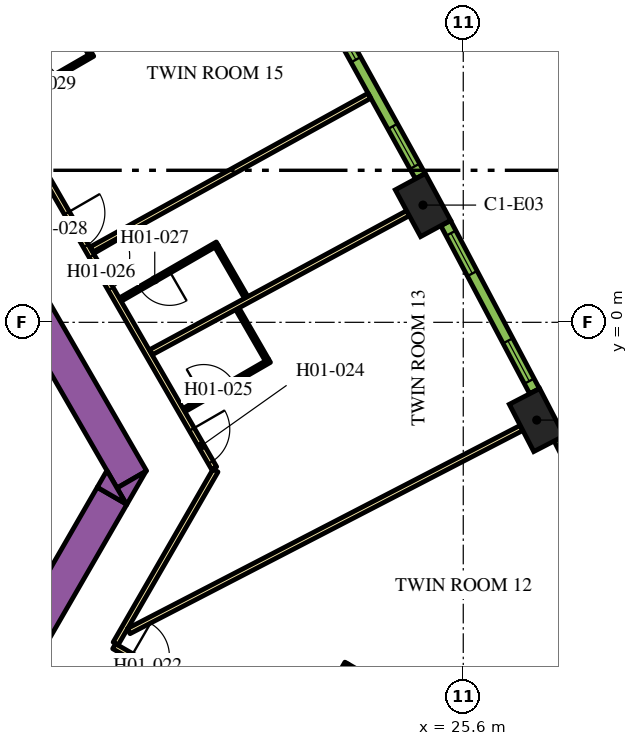
"""IFC4 building model, lengths in metres.
Left out: names, types, materials, properties, quantities, classifications, styles, units other than length and angle.
Written with IfcOpenShell. Run it as: python <this file> out.ifc"""

import sys

from ifc_helpers import new_model, si_unit, direction, frame, frame_2d, origin, origin_2d, place, context, subcontext, project, spatial, polyline, rectangle, outline, extrude, element, fill, save


model = new_model("IFC4")
c1 = context("Model", 3, precision=1e-05, world=origin(), true_north=direction((0.0, 1.0)))
c2 = subcontext(c1, "Body", "Model", "MODEL_VIEW")
j1 = project(units=[si_unit("LENGTHUNIT", "METRE"), si_unit("PLANEANGLEUNIT", "RADIAN")], contexts=[c1])
p1 = place(None, origin())
s1 = spatial("IfcSite", under=j1, at=p1, CompositionType="ELEMENT")
p2 = place(p1, origin())
s2 = spatial("IfcBuilding", under=s1, at=p2, CompositionType="ELEMENT")
p3 = place(p2, frame((0.0, 0.0, 35.4)))
s3 = spatial("IfcBuildingStorey", under=s2, at=p3, CompositionType="ELEMENT", Elevation=35.4)
for number, where, z_axis, x_axis in (
    (1, (27.533, -2.572, 0.0), (0.0, 0.0, 1.0), (-0.459, 0.888, 0.0)),
    (2, (24.54, 3.085, 0.0), (0.0, 0.0, 1.0), (-0.476, 0.88, 0.0)),
):
    element("IfcColumn", number, at=place(p3, frame(where, z_axis=z_axis, x_axis=x_axis)), inside=s3, PredefinedType="COLUMN", context=c2, shape_type="SweptSolid", body=[
        extrude(rectangle(XDim=1.4, YDim=0.9, at=origin_2d()), origin(), (0.0, 0.0, 1.0), 3.9),
    ])
p4 = place(p3, frame((6.711, 13.476, 0.0), z_axis=(0.0, 0.0, 1.0), x_axis=(0.500002723396, -0.866023831425, 0.0)))
e3 = element("IfcWall", 3, at=p4, inside=s3, PredefinedType="SOLIDWALL", context=c2, shape_type="SweptSolid", body=[
    extrude(rectangle(XDim=20.334, YDim=0.9, at=frame_2d((10.167, 0.0))), origin(), (0.0, 0.0, 1.0), 3.9),
])
p5 = place(p3, origin())
e4 = element("IfcWall", 4, at=p5, inside=s3, PredefinedType="SOLIDWALL", context=c2, shape_type="SweptSolid", body=[
    extrude(outline(polyline([(16.743, -4.8), (16.489, -4.36), (17.251, -3.92), (16.743, -4.8)])), origin(), (0.0, 0.0, 1.0), 3.9),
])
p6 = place(p3, frame((11.695, -12.644, 0.0), z_axis=(0.0, 0.0, 1.0), x_axis=(0.500010229568, 0.86601949766, 0.0)))
e5 = element("IfcWall", 5, at=p6, inside=s3, PredefinedType="SOLIDWALL", context=c2, shape_type="SweptSolid", body=[
    extrude(rectangle(XDim=9.326, YDim=0.9, at=frame_2d((4.663, 0.0))), origin(), (0.0, 0.0, 1.0), 3.9),
])
e6 = element("IfcWall", 6, at=p5, inside=s3, PredefinedType="SOLIDWALL", context=c2, shape_type="SweptSolid", body=[
    extrude(outline(polyline([(16.223, -3.9), (16.732, -4.78), (15.969, -4.34), (16.223, -3.9)])), origin(), (0.0, 0.0, 1.0), 3.9),
])
p7 = place(p3, frame((16.412, -8.523, 0.0), z_axis=(0.0, 0.0, 1.0), x_axis=(0.866022197818, -0.500005552856, 0.0)))
e7 = element("IfcWall", 7, at=p7, inside=s3, PredefinedType="PARTITIONING", context=c2, shape_type="SweptSolid", body=[
    extrude(rectangle(XDim=16.224, YDim=0.15, at=frame_2d((8.112, 0.0))), origin(), (0.0, 0.0, 1.0), 2.75),
])
p8 = place(p7, frame((7.949, 0.0, 0.0)))
e8 = element("IfcOpeningElement", 8, at=p8, cuts=e7, PredefinedType="OPENING", context=c2, shape_type="SweptSolid", body=[
    extrude(rectangle(XDim=1.0, YDim=2.1, at=frame_2d((0.5, 1.05))), frame((0.0, 0.085, 0.0), z_axis=(0.0, -1.0, 0.0), x_axis=(1.0, 0.0, 0.0)), (0.0, 0.0, 1.0), 0.17),
])
p9 = place(p7, frame((0.526, 0.0, 0.0)))
e9 = element("IfcOpeningElement", 9, at=p9, cuts=e7, PredefinedType="OPENING", context=c2, shape_type="SweptSolid", body=[
    extrude(rectangle(XDim=1.0, YDim=2.1, at=frame_2d((0.5, 1.05))), frame((0.0, 0.085, 0.0), z_axis=(0.0, -1.0, 0.0), x_axis=(1.0, 0.0, 0.0)), (0.0, 0.0, 1.0), 0.17),
])
p10 = place(p3, frame((19.081, -3.9, 0.0), z_axis=(0.0, 0.0, 1.0), x_axis=(-0.499974327079, -0.866040225545, 0.0)))
e10 = element("IfcWall", 10, at=p10, inside=s3, PredefinedType="PARTITIONING", context=c2, shape_type="SweptSolid", body=[
    extrude(rectangle(XDim=5.258, YDim=0.15, at=frame_2d((2.629, 0.0))), origin(), (0.0, 0.0, 1.0), 2.75),
])
p11 = place(p3, frame((6.163, 18.475, 0.0), z_axis=(0.0, 0.0, 1.0), x_axis=(0.500001317485, -0.866024643133, 0.0)))
e11 = element("IfcWall", 11, at=p11, inside=s3, PredefinedType="PARTITIONING", context=c2, shape_type="SweptSolid", body=[
    extrude(rectangle(XDim=25.767, YDim=0.15, at=frame_2d((12.883, 0.0))), origin(), (0.0, 0.0, 1.0), 2.75),
])
p12 = place(p11, frame((24.586, 0.0, 0.0)))
e12 = element("IfcOpeningElement", 12, at=p12, cuts=e11, PredefinedType="OPENING", context=c2, shape_type="SweptSolid", body=[
    extrude(rectangle(XDim=1.0, YDim=2.1, at=frame_2d((0.5, 1.05))), frame((0.0, 0.085, 0.0), z_axis=(0.0, -1.0, 0.0), x_axis=(1.0, 0.0, 0.0)), (0.0, 0.0, 1.0), 0.17),
])
p13 = place(p11, frame((19.319, 0.0, 0.0)))
e13 = element("IfcOpeningElement", 13, at=p13, cuts=e11, PredefinedType="OPENING", context=c2, shape_type="SweptSolid", body=[
    extrude(rectangle(XDim=1.0, YDim=2.1, at=frame_2d((0.5, 1.05))), frame((0.0, 0.085, 0.0), z_axis=(0.0, -1.0, 0.0), x_axis=(1.0, 0.0, 0.0)), (0.0, 0.0, 1.0), 0.17),
])
p14 = place(p11, frame((18.012, 0.0, 0.0)))
e14 = element("IfcOpeningElement", 14, at=p14, cuts=e11, PredefinedType="OPENING", context=c2, shape_type="SweptSolid", body=[
    extrude(rectangle(XDim=1.0, YDim=2.1, at=frame_2d((0.5, 1.05))), frame((0.0, 0.085, 0.0), z_axis=(0.0, -1.0, 0.0), x_axis=(1.0, 0.0, 0.0)), (0.0, 0.0, 1.0), 0.17),
])
p15 = place(p11, frame((6.824, 0.0, 0.0)))
e15 = element("IfcOpeningElement", 15, at=p15, cuts=e11, PredefinedType="OPENING", context=c2, shape_type="SweptSolid", body=[
    extrude(rectangle(XDim=1.1, YDim=2.1, at=frame_2d((0.55, 1.05))), frame((0.0, 0.085, 0.0), z_axis=(0.0, -1.0, 0.0), x_axis=(1.0, 0.0, 0.0)), (0.0, 0.0, 1.0), 0.17),
])
p16 = place(p11, frame((4.658, 0.0, 0.0)))
e16 = element("IfcOpeningElement", 16, at=p16, cuts=e11, PredefinedType="OPENING", context=c2, shape_type="SweptSolid", body=[
    extrude(rectangle(XDim=0.9, YDim=2.1, at=frame_2d((0.45, 1.05))), frame((0.0, 0.085, 0.0), z_axis=(0.0, -1.0, 0.0), x_axis=(1.0, 0.0, 0.0)), (0.0, 0.0, 1.0), 0.17),
])
p17 = place(p11, frame((0.18, 0.0, 0.0)))
e17 = element("IfcOpeningElement", 17, at=p17, cuts=e11, PredefinedType="OPENING", context=c2, shape_type="SweptSolid", body=[
    extrude(rectangle(XDim=1.0, YDim=2.1, at=frame_2d((0.5, 1.05))), frame((0.0, 0.085, 0.0), z_axis=(0.0, -1.0, 0.0), x_axis=(1.0, 0.0, 0.0)), (0.0, 0.0, 1.0), 0.17),
])
p18 = place(p3, frame((23.132, 5.962, 0.0), z_axis=(0.0, 0.0, 1.0), x_axis=(-0.875121716713, -0.483902863121, 0.0)))
e18 = element("IfcWall", 18, at=p18, inside=s3, PredefinedType="PARTITIONING", context=c2, shape_type="SweptSolid", body=[
    extrude(rectangle(XDim=8.355, YDim=0.15, at=frame_2d((4.178, 0.0))), origin(), (0.0, 0.0, 1.0), 2.75),
])
p19 = place(p3, frame((27.134, -2.779, 0.0), z_axis=(0.0, 0.0, 1.0), x_axis=(-0.8882049501, -0.459447457951, 0.0)))
e19 = element("IfcWall", 19, at=p19, inside=s3, PredefinedType="PARTITIONING", context=c2, shape_type="SweptSolid", body=[
    extrude(rectangle(XDim=11.638, YDim=0.15, at=frame_2d((5.819, 0.0))), origin(), (0.0, 0.0, 1.0), 2.75),
])
p20 = place(p3, frame((24.145, 2.871, 0.0), z_axis=(0.0, 0.0, 1.0), x_axis=(-0.879551725039, -0.475803281809, 0.0)))
e20 = element("IfcWall", 20, at=p20, inside=s3, PredefinedType="PARTITIONING", context=c2, shape_type="SweptSolid", body=[
    extrude(rectangle(XDim=7.688, YDim=0.15, at=frame_2d((3.844, 0.0))), origin(), (0.0, 0.0, 1.0), 2.75),
])
p21 = place(p3, frame((30.018, -8.483, 0.0), z_axis=(0.0, 0.0, 1.0), x_axis=(-0.896544505264, -0.44295366584, 0.0)))
e21 = element("IfcWall", 21, at=p21, inside=s3, PredefinedType="PARTITIONING", context=c2, shape_type="SweptSolid", body=[
    extrude(rectangle(XDim=8.079, YDim=0.15, at=frame_2d((4.04, 0.0))), origin(), (0.0, 0.0, 1.0), 2.75),
])
p22 = place(p3, frame((22.53, -8.966, 0.0), z_axis=(0.0, 0.0, 1.0), x_axis=(-0.500006934395, -0.866021400173, 0.0)))
e22 = element("IfcWall", 22, at=p22, inside=s3, PredefinedType="PARTITIONING", context=c2, shape_type="SweptSolid", body=[
    extrude(rectangle(XDim=2.6, YDim=0.1, at=frame_2d((1.3, 0.0))), origin(), (0.0, 0.0, 1.0), 2.75),
])
p23 = place(p22, frame((1.1, 0.0, 0.0)))
e23 = element("IfcOpeningElement", 23, at=p23, cuts=e22, PredefinedType="OPENING", context=c2, shape_type="SweptSolid", body=[
    extrude(rectangle(XDim=0.9, YDim=2.1, at=frame_2d((0.45, 1.05))), frame((0.0, 0.06, 0.0), z_axis=(0.0, -1.0, 0.0), x_axis=(1.0, 0.0, 0.0)), (0.0, 0.0, 1.0), 0.12),
])
p24 = place(p3, frame((22.549, -9.035, 0.0), z_axis=(0.0, 0.0, 1.0), x_axis=(0.86605165483, -0.499954529098, 0.0)))
e24 = element("IfcWall", 24, at=p24, inside=s3, PredefinedType="PARTITIONING", context=c2, shape_type="SweptSolid", body=[
    extrude(rectangle(XDim=1.7, YDim=0.1, at=frame_2d((0.85, 0.0))), origin(), (0.0, 0.0, 1.0), 2.75),
])
p25 = place(p3, frame((18.25, -2.311, 0.0), z_axis=(0.0, 0.0, 1.0), x_axis=(0.866021400173, 0.500006934395, 0.0)))
e25 = element("IfcWall", 25, at=p25, inside=s3, PredefinedType="PARTITIONING", context=c2, shape_type="SweptSolid", body=[
    extrude(rectangle(XDim=2.6, YDim=0.1, at=frame_2d((1.3, 0.0))), origin(), (0.0, 0.0, 1.0), 2.75),
])
p26 = place(p25, frame((0.6, 0.0, 0.0)))
e26 = element("IfcOpeningElement", 26, at=p26, cuts=e25, PredefinedType="OPENING", context=c2, shape_type="SweptSolid", body=[
    extrude(rectangle(XDim=0.9, YDim=2.1, at=frame_2d((0.45, 1.05))), frame((0.0, 0.06, 0.0), z_axis=(0.0, -1.0, 0.0), x_axis=(1.0, 0.0, 0.0)), (0.0, 0.0, 1.0), 0.12),
])
p27 = place(p3, frame((20.434, -0.993, 0.0), z_axis=(0.0, 0.0, 1.0), x_axis=(-0.500086022567, 0.865975732936, 0.0)))
e27 = element("IfcWall", 27, at=p27, inside=s3, PredefinedType="PARTITIONING", context=c2, shape_type="SweptSolid", body=[
    extrude(rectangle(XDim=1.55, YDim=0.1, at=frame_2d((0.775, 0.0))), origin(), (0.0, 0.0, 1.0), 2.75),
])
p28 = place(p3, frame((19.127, 2.071, 0.0), z_axis=(0.0, 0.0, 1.0), x_axis=(-0.866003658127, -0.500037662692, 0.0)))
e28 = element("IfcWall", 28, at=p28, inside=s3, PredefinedType="PARTITIONING", context=c2, shape_type="SweptSolid", body=[
    extrude(rectangle(XDim=2.95, YDim=0.1, at=frame_2d((1.475, 0.0))), origin(), (0.0, 0.0, 1.0), 2.75),
])
p29 = place(p28, frame((1.45, 0.0, 0.0)))
e29 = element("IfcOpeningElement", 29, at=p29, cuts=e28, PredefinedType="OPENING", context=c2, shape_type="SweptSolid", body=[
    extrude(rectangle(XDim=0.9, YDim=2.1, at=frame_2d((0.45, 1.05))), frame((0.0, 0.06, 0.0), z_axis=(0.0, -1.0, 0.0), x_axis=(1.0, 0.0, 0.0)), (0.0, 0.0, 1.0), 0.12),
])
p30 = place(p3, frame((19.109, 2.002, 0.0), z_axis=(0.0, 0.0, 1.0), x_axis=(0.500086022567, -0.865975732936, 0.0)))
e30 = element("IfcWall", 30, at=p30, inside=s3, PredefinedType="PARTITIONING", context=c2, shape_type="SweptSolid", body=[
    extrude(rectangle(XDim=1.55, YDim=0.1, at=frame_2d((0.775, 0.0))), origin(), (0.0, 0.0, 1.0), 2.75),
])
p31 = place(p3, frame((13.6, 5.744, 0.0), z_axis=(0.0, 0.0, 1.0), x_axis=(0.866021400173, 0.500006934395, 0.0)))
e31 = element("IfcWall", 31, at=p31, inside=s3, PredefinedType="PARTITIONING", context=c2, shape_type="SweptSolid", body=[
    extrude(rectangle(XDim=2.6, YDim=0.1, at=frame_2d((1.3, 0.0))), origin(), (0.0, 0.0, 1.0), 2.75),
])
p32 = place(p31, frame((0.6, 0.0, 0.0)))
e32 = element("IfcOpeningElement", 32, at=p32, cuts=e31, PredefinedType="OPENING", context=c2, shape_type="SweptSolid", body=[
    extrude(rectangle(XDim=0.9, YDim=2.1, at=frame_2d((0.45, 1.05))), frame((0.0, 0.06, 0.0), z_axis=(0.0, -1.0, 0.0), x_axis=(1.0, 0.0, 0.0)), (0.0, 0.0, 1.0), 0.12),
])
p33 = place(p3, frame((15.779, 7.071, 0.0), z_axis=(0.0, 0.0, 1.0), x_axis=(-0.499976720371, 0.866038843867, 0.0)))
e33 = element("IfcWall", 33, at=p33, inside=s3, PredefinedType="PARTITIONING", context=c2, shape_type="SweptSolid", body=[
    extrude(rectangle(XDim=1.69, YDim=0.1, at=frame_2d((0.845, 0.0))), origin(), (0.0, 0.0, 1.0), 2.75),
])
p34 = place(p3, frame((30.377, -7.521, 0.0), z_axis=(0.0, 0.0, 1.0), x_axis=(-0.451233929645, 0.892405704115, 0.0)))
e34 = element("IfcWall", 34, at=p34, inside=s3, PredefinedType="SOLIDWALL", context=c2, shape_type="SweptSolid", body=[
    extrude(rectangle(XDim=4.998, YDim=0.29, at=frame_2d((2.499, 0.0))), origin(), (0.0, 0.0, 1.0), 3.65),
])
p35 = place(p34, frame((0.297, 0.0, 0.9)))
e35 = element("IfcOpeningElement", 35, at=p35, cuts=e34, PredefinedType="OPENING", context=c2, shape_type="SweptSolid", body=[
    extrude(rectangle(XDim=1.2, YDim=2.15, at=frame_2d((0.6, 1.075))), frame((0.0, 0.155, 0.0), z_axis=(0.0, -1.0, 0.0), x_axis=(1.0, 0.0, 0.0)), (0.0, 0.0, 1.0), 0.31),
])
p36 = place(p34, frame((3.501, 0.0, 0.9)))
e36 = element("IfcOpeningElement", 36, at=p36, cuts=e34, PredefinedType="OPENING", context=c2, shape_type="SweptSolid", body=[
    extrude(rectangle(XDim=1.2, YDim=2.15, at=frame_2d((0.6, 1.075))), frame((0.0, 0.155, 0.0), z_axis=(0.0, -1.0, 0.0), x_axis=(1.0, 0.0, 0.0)), (0.0, 0.0, 1.0), 0.31),
])
p37 = place(p3, frame((27.475, -1.81, 0.0), z_axis=(0.0, 0.0, 1.0), x_axis=(-0.467629620899, 0.883924509026, 0.0)))
e37 = element("IfcWall", 37, at=p37, inside=s3, PredefinedType="SOLIDWALL", context=c2, shape_type="SweptSolid", body=[
    extrude(rectangle(XDim=4.998, YDim=0.29, at=frame_2d((2.499, 0.0))), origin(), (0.0, 0.0, 1.0), 3.65),
])
p38 = place(p37, frame((0.297, 0.0, 0.9)))
e38 = element("IfcOpeningElement", 38, at=p38, cuts=e37, PredefinedType="OPENING", context=c2, shape_type="SweptSolid", body=[
    extrude(rectangle(XDim=1.2, YDim=2.15, at=frame_2d((0.6, 1.075))), frame((0.0, 0.155, 0.0), z_axis=(0.0, -1.0, 0.0), x_axis=(1.0, 0.0, 0.0)), (0.0, 0.0, 1.0), 0.31),
])
p39 = place(p37, frame((3.501, 0.0, 0.9)))
e39 = element("IfcOpeningElement", 39, at=p39, cuts=e37, PredefinedType="OPENING", context=c2, shape_type="SweptSolid", body=[
    extrude(rectangle(XDim=1.2, YDim=2.15, at=frame_2d((0.6, 1.075))), frame((0.0, 0.155, 0.0), z_axis=(0.0, -1.0, 0.0), x_axis=(1.0, 0.0, 0.0)), (0.0, 0.0, 1.0), 0.31),
])
p40 = place(p3, frame((24.468, 3.846, 0.0), z_axis=(0.0, 0.0, 1.0), x_axis=(-0.483912572871, 0.875116347589, 0.0)))
e40 = element("IfcWall", 40, at=p40, inside=s3, PredefinedType="SOLIDWALL", context=c2, shape_type="SweptSolid", body=[
    extrude(rectangle(XDim=4.998, YDim=0.29, at=frame_2d((2.499, 0.0))), origin(), (0.0, 0.0, 1.0), 3.65),
])
p41 = place(p40, frame((0.297, 0.0, 0.9)))
e41 = element("IfcOpeningElement", 41, at=p41, cuts=e40, PredefinedType="OPENING", context=c2, shape_type="SweptSolid", body=[
    extrude(rectangle(XDim=1.2, YDim=2.15, at=frame_2d((0.6, 1.075))), frame((0.0, 0.155, 0.0), z_axis=(0.0, -1.0, 0.0), x_axis=(1.0, 0.0, 0.0)), (0.0, 0.0, 1.0), 0.31),
])
p42 = place(p40, frame((3.501, 0.0, 0.9)))
e42 = element("IfcOpeningElement", 42, at=p42, cuts=e40, PredefinedType="OPENING", context=c2, shape_type="SweptSolid", body=[
    extrude(rectangle(XDim=1.2, YDim=2.15, at=frame_2d((0.6, 1.075))), frame((0.0, 0.155, 0.0), z_axis=(0.0, -1.0, 0.0), x_axis=(1.0, 0.0, 0.0)), (0.0, 0.0, 1.0), 0.31),
])
p43 = place(p9, origin())
e43 = element("IfcDoor", 43, at=p43, inside=s3, OperationType="SINGLE_SWING_LEFT", PredefinedType="DOOR", context=c2, shape_type="SweptSolid", body=[
    extrude(rectangle(XDim=1.0, YDim=2.1, at=frame_2d((0.5, 1.05))), frame((0.0, 0.025, 0.0), z_axis=(0.0, -1.0, 0.0), x_axis=(1.0, 0.0, 0.0)), (0.0, 0.0, 1.0), 0.05),
])
fill(e9, e43)
p44 = place(p12, origin())
e44 = element("IfcDoor", 44, at=p44, inside=s3, OperationType="SINGLE_SWING_RIGHT", PredefinedType="DOOR", context=c2, shape_type="SweptSolid", body=[
    extrude(rectangle(XDim=1.0, YDim=2.1, at=frame_2d((0.5, 1.05))), frame((0.0, 0.025, 0.0), z_axis=(0.0, -1.0, 0.0), x_axis=(1.0, 0.0, 0.0)), (0.0, 0.0, 1.0), 0.05),
])
fill(e12, e44)
p45 = place(p26, origin())
e45 = element("IfcDoor", 45, at=p45, inside=s3, OperationType="SINGLE_SWING_LEFT", PredefinedType="DOOR", context=c2, shape_type="SweptSolid", body=[
    extrude(rectangle(XDim=0.9, YDim=2.1, at=frame_2d((0.45, 1.05))), frame((0.0, 0.025, 0.0), z_axis=(0.0, -1.0, 0.0), x_axis=(1.0, 0.0, 0.0)), (0.0, 0.0, 1.0), 0.05),
])
fill(e26, e45)
p46 = place(p13, origin())
e46 = element("IfcDoor", 46, at=p46, inside=s3, OperationType="SINGLE_SWING_LEFT", PredefinedType="DOOR", context=c2, shape_type="SweptSolid", body=[
    extrude(rectangle(XDim=1.0, YDim=2.1, at=frame_2d((0.5, 1.05))), frame((0.0, 0.025, 0.0), z_axis=(0.0, -1.0, 0.0), x_axis=(1.0, 0.0, 0.0)), (0.0, 0.0, 1.0), 0.05),
])
fill(e13, e46)
p47 = place(p29, origin())
e47 = element("IfcDoor", 47, at=p47, inside=s3, OperationType="SINGLE_SWING_LEFT", PredefinedType="DOOR", context=c2, shape_type="SweptSolid", body=[
    extrude(rectangle(XDim=0.9, YDim=2.1, at=frame_2d((0.45, 1.05))), frame((0.0, 0.025, 0.0), z_axis=(0.0, -1.0, 0.0), x_axis=(1.0, 0.0, 0.0)), (0.0, 0.0, 1.0), 0.05),
])
fill(e29, e47)
p48 = place(p14, origin())
e48 = element("IfcDoor", 48, at=p48, inside=s3, OperationType="SINGLE_SWING_RIGHT", PredefinedType="DOOR", context=c2, shape_type="SweptSolid", body=[
    extrude(rectangle(XDim=1.0, YDim=2.1, at=frame_2d((0.5, 1.05))), frame((0.0, 0.025, 0.0), z_axis=(0.0, -1.0, 0.0), x_axis=(1.0, 0.0, 0.0)), (0.0, 0.0, 1.0), 0.05),
])
fill(e14, e48)
p49 = place(p32, origin())
e49 = element("IfcDoor", 49, at=p49, inside=s3, OperationType="SINGLE_SWING_RIGHT", PredefinedType="DOOR", context=c2, shape_type="SweptSolid", body=[
    extrude(rectangle(XDim=0.9, YDim=2.1, at=frame_2d((0.45, 1.05))), frame((0.0, 0.025, 0.0), z_axis=(0.0, -1.0, 0.0), x_axis=(1.0, 0.0, 0.0)), (0.0, 0.0, 1.0), 0.05),
])
fill(e32, e49)
p50 = place(p38, origin())
e50 = element("IfcWindow", 50, at=p50, inside=s3, PartitioningType="DOUBLE_PANEL_VERTICAL", PredefinedType="WINDOW", context=c2, shape_type="SweptSolid", body=[
    extrude(rectangle(XDim=1.2, YDim=2.15, at=frame_2d((0.6, 1.075))), frame((0.0, 0.015, 0.0), z_axis=(0.0, -1.0, 0.0), x_axis=(1.0, 0.0, 0.0)), (0.0, 0.0, 1.0), 0.06),
])
fill(e38, e50)
p51 = place(p39, origin())
e51 = element("IfcWindow", 51, at=p51, inside=s3, PartitioningType="DOUBLE_PANEL_VERTICAL", PredefinedType="WINDOW", context=c2, shape_type="SweptSolid", body=[
    extrude(rectangle(XDim=1.2, YDim=2.15, at=frame_2d((0.6, 1.075))), frame((0.0, 0.015, 0.0), z_axis=(0.0, -1.0, 0.0), x_axis=(1.0, 0.0, 0.0)), (0.0, 0.0, 1.0), 0.06),
])
fill(e39, e51)
p52 = place(p41, origin())
e52 = element("IfcWindow", 52, at=p52, inside=s3, PartitioningType="DOUBLE_PANEL_VERTICAL", PredefinedType="WINDOW", context=c2, shape_type="SweptSolid", body=[
    extrude(rectangle(XDim=1.2, YDim=2.15, at=frame_2d((0.6, 1.075))), frame((0.0, 0.015, 0.0), z_axis=(0.0, -1.0, 0.0), x_axis=(1.0, 0.0, 0.0)), (0.0, 0.0, 1.0), 0.06),
])
fill(e41, e52)
p53 = place(p42, origin())
e53 = element("IfcWindow", 53, at=p53, inside=s3, PartitioningType="DOUBLE_PANEL_VERTICAL", PredefinedType="WINDOW", context=c2, shape_type="SweptSolid", body=[
    extrude(rectangle(XDim=1.2, YDim=2.15, at=frame_2d((0.6, 1.075))), frame((0.0, 0.015, 0.0), z_axis=(0.0, -1.0, 0.0), x_axis=(1.0, 0.0, 0.0)), (0.0, 0.0, 1.0), 0.06),
])
fill(e42, e53)
save(model, sys.argv[1])
